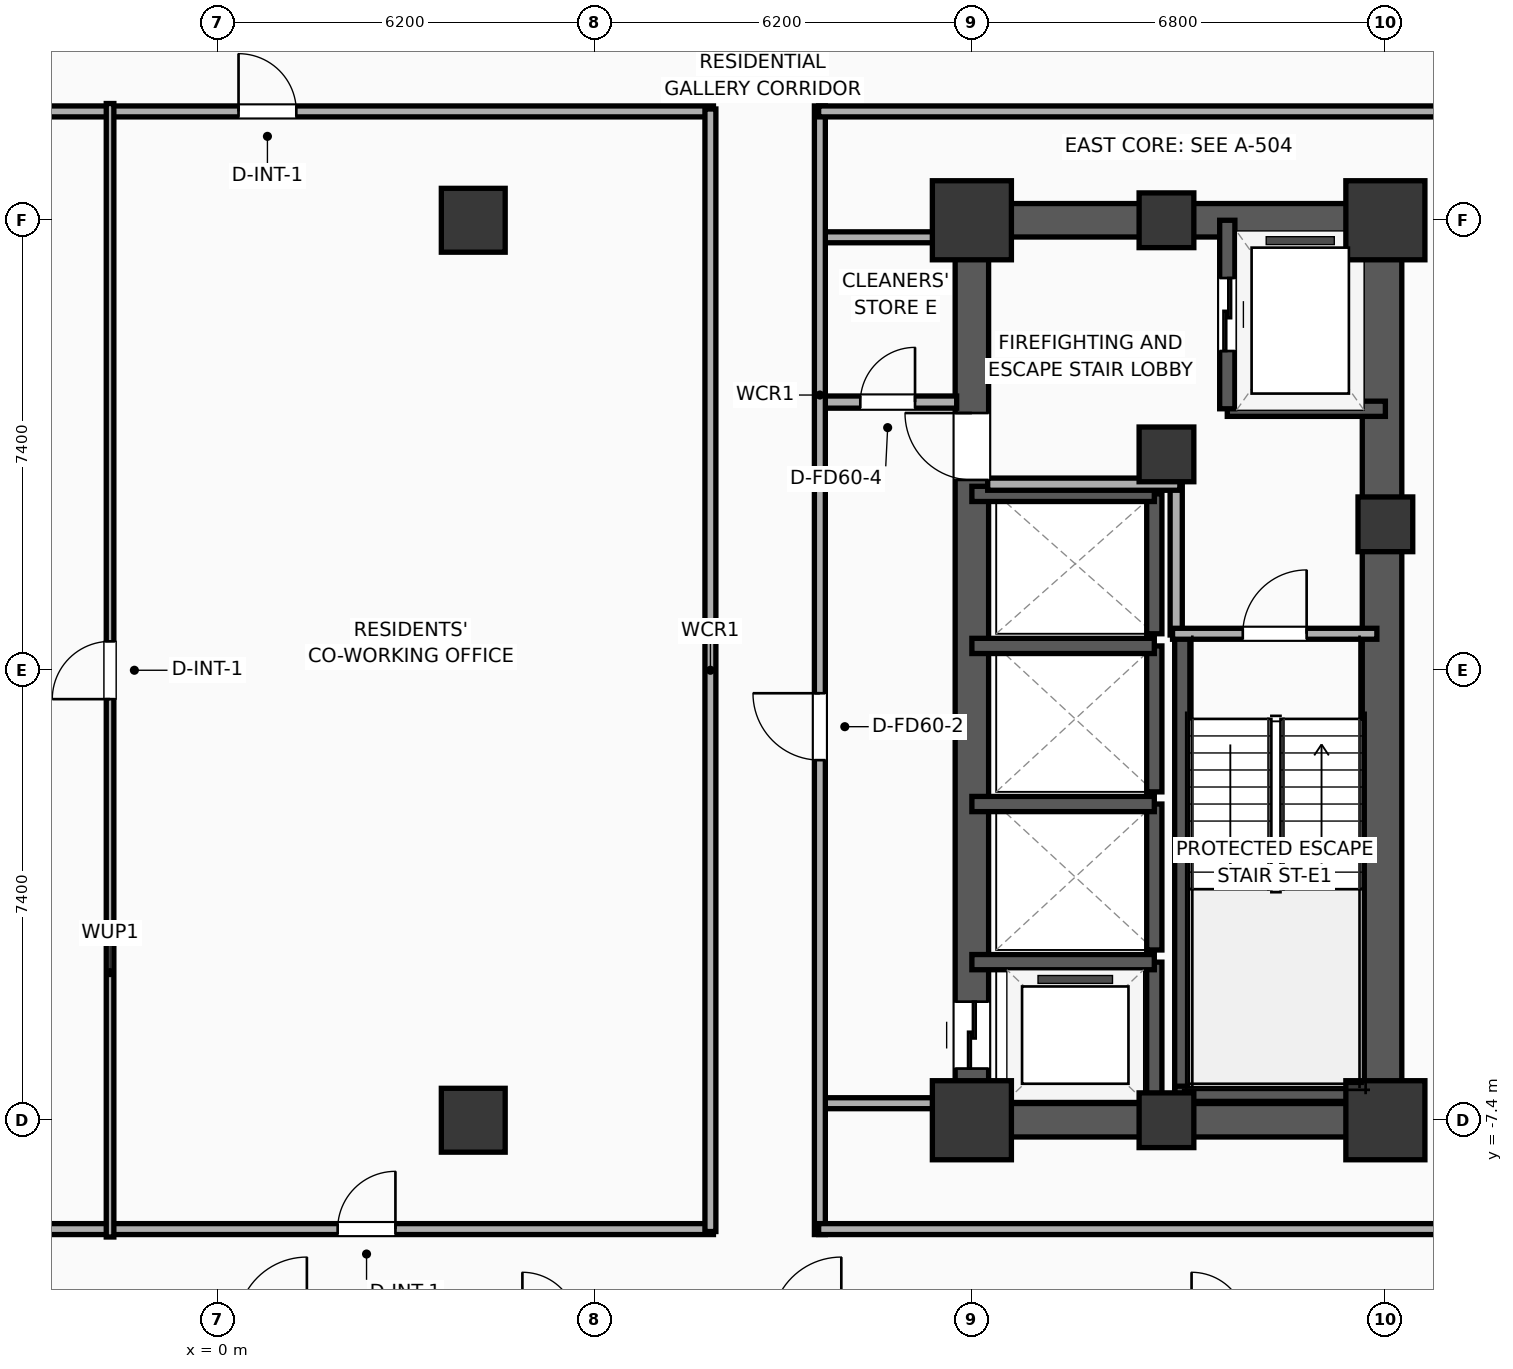
"""IFC4 building model, lengths in metres.
Left out: names, types, materials, properties, quantities, classifications, styles, units other than length and angle.
Written with IfcOpenShell. Run it as: python <this file> out.ifc"""

import sys

from ifc_helpers import new_model, si_unit, direction, frame, frame_2d, origin, origin_2d, place, context, subcontext, project, spatial, rectangle, extrude, element, fill, save


model = new_model("IFC4")
c1 = context("Model", 3, precision=1e-05, world=origin(), true_north=direction((0.0, 1.0)))
c2 = subcontext(c1, "Body", "Model", "MODEL_VIEW")
j1 = project(units=[si_unit("LENGTHUNIT", "METRE"), si_unit("PLANEANGLEUNIT", "RADIAN")], contexts=[c1])
p1 = place(None, origin())
s1 = spatial("IfcSite", under=j1, at=p1, CompositionType="ELEMENT")
p2 = place(p1, origin())
s2 = spatial("IfcBuilding", under=s1, at=p2, CompositionType="ELEMENT")
p3 = place(p2, frame((0.0, 0.0, 85.8)))
s3 = spatial("IfcBuildingStorey", under=s2, at=p3, CompositionType="ELEMENT", Elevation=85.8)
p4 = place(p3, frame((12.4, -7.4, 0.0), z_axis=(0.0, 0.0, 1.0), x_axis=(1.0, 0.0, 0.0)))
e1 = element("IfcColumn", 1, at=p4, inside=s3, PredefinedType="COLUMN", context=c2, shape_type="SweptSolid", body=[
    extrude(rectangle(XDim=1.3, YDim=1.3, at=origin_2d()), origin(), (0.0, 0.0, 1.0), 3.9),
])
p5 = place(p3, frame((15.6, 3.55, 0.0), z_axis=(0.0, 0.0, 1.0), x_axis=(1.0, 0.0, 0.0)))
e2 = element("IfcColumn", 2, at=p5, inside=s3, PredefinedType="COLUMN", context=c2, shape_type="SweptSolid", body=[
    extrude(rectangle(XDim=0.9, YDim=0.9, at=origin_2d()), origin(), (0.0, 0.0, 1.0), 3.9),
])
p6 = place(p3, frame((12.4, 7.4, 0.0), z_axis=(0.0, 0.0, 1.0), x_axis=(1.0, 0.0, 0.0)))
e3 = element("IfcColumn", 3, at=p6, inside=s3, PredefinedType="COLUMN", context=c2, shape_type="SweptSolid", body=[
    extrude(rectangle(XDim=1.3, YDim=1.3, at=origin_2d()), origin(), (0.0, 0.0, 1.0), 3.9),
])
for number, where, z_axis, x_axis in (
    (4, (15.6, -7.4, 0.0), (0.0, 0.0, 1.0), (1.0, 0.0, 0.0)),
    (5, (15.6, 7.4, 0.0), (0.0, 0.0, 1.0), (1.0, 0.0, 0.0)),
):
    element("IfcColumn", number, at=place(p3, frame(where, z_axis=z_axis, x_axis=x_axis)), inside=s3, PredefinedType="COLUMN", context=c2, shape_type="SweptSolid", body=[
        extrude(rectangle(XDim=0.9, YDim=0.9, at=origin_2d()), origin(), (0.0, 0.0, 1.0), 3.9),
    ])
p7 = place(p3, frame((19.2, -7.4, 0.0), z_axis=(0.0, 0.0, 1.0), x_axis=(1.0, 0.0, 0.0)))
e6 = element("IfcColumn", 6, at=p7, inside=s3, PredefinedType="COLUMN", context=c2, shape_type="SweptSolid", body=[
    extrude(rectangle(XDim=1.3, YDim=1.3, at=origin_2d()), origin(), (0.0, 0.0, 1.0), 3.9),
])
p8 = place(p3, frame((19.2, 2.4, 0.0), z_axis=(0.0, 0.0, 1.0), x_axis=(1.0, 0.0, 0.0)))
e7 = element("IfcColumn", 7, at=p8, inside=s3, PredefinedType="COLUMN", context=c2, shape_type="SweptSolid", body=[
    extrude(rectangle(XDim=0.9, YDim=0.9, at=origin_2d()), origin(), (0.0, 0.0, 1.0), 3.9),
])
p9 = place(p3, frame((19.2, 7.4, 0.0), z_axis=(0.0, 0.0, 1.0), x_axis=(1.0, 0.0, 0.0)))
e8 = element("IfcColumn", 8, at=p9, inside=s3, PredefinedType="COLUMN", context=c2, shape_type="SweptSolid", body=[
    extrude(rectangle(XDim=1.3, YDim=1.3, at=origin_2d()), origin(), (0.0, 0.0, 1.0), 3.9),
])
for number, where, z_axis, x_axis in (
    (9, (12.125, -7.4, 0.0), (0.0, 0.0, 1.0), (1.0, 0.0, 0.0)),
    (10, (12.125, 7.4, 0.0), (0.0, 0.0, 1.0), (1.0, 0.0, 0.0)),
):
    element("IfcWall", number, at=place(p3, frame(where, z_axis=z_axis, x_axis=x_axis)), inside=s3, PredefinedType="SHEAR", context=c2, shape_type="SweptSolid", body=[
        extrude(rectangle(XDim=7.35, YDim=0.55, at=frame_2d((3.675, 0.0))), origin(), (0.0, 0.0, 1.0), 3.65),
    ])
p10 = place(p3, frame((12.4, -7.4, 0.0), z_axis=(0.0, 0.0, 1.0), x_axis=(0.0, 1.0, 0.0)))
e11 = element("IfcWall", 11, at=p10, inside=s3, PredefinedType="SHEAR", context=c2, shape_type="SweptSolid", body=[
    extrude(rectangle(XDim=14.8, YDim=0.55, at=frame_2d((7.4, 0.0))), origin(), (0.0, 0.0, 1.0), 3.65),
])
p11 = place(p10, frame((0.85, 0.0, 0.0)))
e12 = element("IfcOpeningElement", 12, at=p11, cuts=e11, PredefinedType="OPENING", context=c2, shape_type="SweptSolid", body=[
    extrude(rectangle(XDim=1.1, YDim=2.05, at=frame_2d((0.55, 1.025))), frame((0.0, 0.285, 0.0), z_axis=(0.0, -1.0, 0.0), x_axis=(1.0, 0.0, 0.0)), (0.0, 0.0, 1.0), 0.57),
])
p12 = place(p10, frame((10.53, 0.0, 0.0)))
e13 = element("IfcOpeningElement", 13, at=p12, cuts=e11, PredefinedType="OPENING", context=c2, shape_type="SweptSolid", body=[
    extrude(rectangle(XDim=1.1, YDim=2.05, at=frame_2d((0.55, 1.025))), frame((0.0, 0.285, 0.0), z_axis=(0.0, -1.0, 0.0), x_axis=(1.0, 0.0, 0.0)), (0.0, 0.0, 1.0), 0.57),
])
p13 = place(p3, frame((19.145, -7.4, 0.0), z_axis=(0.0, 0.0, 1.0), x_axis=(0.0, 1.0, 0.0)))
e14 = element("IfcWall", 14, at=p13, inside=s3, PredefinedType="SHEAR", context=c2, shape_type="SweptSolid", body=[
    extrude(rectangle(XDim=14.8, YDim=0.65, at=frame_2d((7.4, 0.0))), origin(), (0.0, 0.0, 1.0), 3.65),
])
p14 = place(p3, frame((15.86, -7.085, 0.0), z_axis=(0.0, 0.0, 1.0), x_axis=(0.0, 1.0, 0.0)))
e15 = element("IfcWall", 15, at=p14, inside=s3, PredefinedType="SOLIDWALL", context=c2, shape_type="SweptSolid", body=[
    extrude(rectangle(XDim=7.685, YDim=0.25, at=frame_2d((3.843, 0.0))), origin(), (0.0, 0.0, 1.0), 3.65),
])
p15 = place(p3, frame((15.74, -6.965, 0.0), z_axis=(0.0, 0.0, 1.0), x_axis=(1.0, 0.0, 0.0)))
e16 = element("IfcWall", 16, at=p15, inside=s3, PredefinedType="SOLIDWALL", context=c2, shape_type="SweptSolid", body=[
    extrude(rectangle(XDim=3.46, YDim=0.25, at=frame_2d((1.73, 0.0))), origin(), (0.0, 0.0, 1.0), 3.65),
])
for number, where, z_axis, x_axis in (
    (17, (4.2, -7.4, 0.0), (0.0, 0.0, 1.0), (1.0, 0.0, 0.0)),
    (18, (4.2, 7.4, 0.0), (0.0, 0.0, 1.0), (1.0, 0.0, 0.0)),
):
    element("IfcColumn", number, at=place(p3, frame(where, z_axis=z_axis, x_axis=x_axis)), inside=s3, PredefinedType="COLUMN", context=c2, shape_type="SweptSolid", body=[
        extrude(rectangle(XDim=1.05, YDim=1.05, at=origin_2d()), origin(), (0.0, 0.0, 1.0), 3.9),
    ])
p16 = place(p3, frame((16.6, 4.3, 0.0), z_axis=(0.0, 0.0, 1.0), x_axis=(1.0, 0.0, 0.0)))
e19 = element("IfcWall", 19, at=p16, inside=s3, PredefinedType="SOLIDWALL", context=c2, shape_type="SweptSolid", body=[
    extrude(rectangle(XDim=2.6, YDim=0.25, at=frame_2d((1.3, 0.0))), origin(), (0.0, 0.0, 1.0), 3.65),
])
p17 = place(p3, frame((16.6, 7.4, 0.0), z_axis=(0.0, 0.0, 1.0), x_axis=(0.0, -1.0, 0.0)))
e20 = element("IfcWall", 20, at=p17, inside=s3, PredefinedType="SOLIDWALL", context=c2, shape_type="SweptSolid", body=[
    extrude(rectangle(XDim=3.1, YDim=0.25, at=frame_2d((1.55, 0.0))), origin(), (0.0, 0.0, 1.0), 3.65),
])
p18 = place(p17, frame((0.95, 0.0, 0.0)))
e21 = element("IfcOpeningElement", 21, at=p18, cuts=e20, PredefinedType="OPENING", context=c2, shape_type="SweptSolid", body=[
    extrude(rectangle(XDim=1.2, YDim=2.05, at=frame_2d((0.6, 1.025))), frame((0.0, 0.135, 0.0), z_axis=(0.0, -1.0, 0.0), x_axis=(1.0, 0.0, 0.0)), (0.0, 0.0, 1.0), 0.27),
])
p19 = place(p3, frame((15.4, -7.4, 0.0), z_axis=(0.0, 0.0, 1.0), x_axis=(0.0, 1.0, 0.0)))
e22 = element("IfcWall", 22, at=p19, inside=s3, PredefinedType="SOLIDWALL", context=c2, shape_type="SweptSolid", body=[
    extrude(rectangle(XDim=2.6, YDim=0.25, at=frame_2d((1.3, 0.0))), origin(), (0.0, 0.0, 1.0), 3.65),
])
p20 = place(p3, frame((15.4, -4.8, 0.0), z_axis=(0.0, 0.0, 1.0), x_axis=(-1.0, 0.0, 0.0)))
e23 = element("IfcWall", 23, at=p20, inside=s3, PredefinedType="SOLIDWALL", context=c2, shape_type="SweptSolid", body=[
    extrude(rectangle(XDim=3.0, YDim=0.25, at=frame_2d((1.5, 0.0))), origin(), (0.0, 0.0, 1.0), 3.65),
])
p21 = place(p3, frame((15.4, -4.6, 0.0), z_axis=(0.0, 0.0, 1.0), x_axis=(0.0, 1.0, 0.0)))
e24 = element("IfcWall", 24, at=p21, inside=s3, PredefinedType="SOLIDWALL", context=c2, shape_type="SweptSolid", body=[
    extrude(rectangle(XDim=2.4, YDim=0.25, at=frame_2d((1.2, 0.0))), origin(), (0.0, 0.0, 1.0), 3.65),
])
p22 = place(p3, frame((15.4, -2.2, 0.0), z_axis=(0.0, 0.0, 1.0), x_axis=(-1.0, 0.0, 0.0)))
e25 = element("IfcWall", 25, at=p22, inside=s3, PredefinedType="SOLIDWALL", context=c2, shape_type="SweptSolid", body=[
    extrude(rectangle(XDim=3.0, YDim=0.25, at=frame_2d((1.5, 0.0))), origin(), (0.0, 0.0, 1.0), 3.65),
])
p23 = place(p3, frame((15.4, -2.0, 0.0), z_axis=(0.0, 0.0, 1.0), x_axis=(0.0, 1.0, 0.0)))
e26 = element("IfcWall", 26, at=p23, inside=s3, PredefinedType="SOLIDWALL", context=c2, shape_type="SweptSolid", body=[
    extrude(rectangle(XDim=2.4, YDim=0.25, at=frame_2d((1.2, 0.0))), origin(), (0.0, 0.0, 1.0), 3.65),
])
p24 = place(p3, frame((15.4, 0.4, 0.0), z_axis=(0.0, 0.0, 1.0), x_axis=(-1.0, 0.0, 0.0)))
e27 = element("IfcWall", 27, at=p24, inside=s3, PredefinedType="SOLIDWALL", context=c2, shape_type="SweptSolid", body=[
    extrude(rectangle(XDim=3.0, YDim=0.25, at=frame_2d((1.5, 0.0))), origin(), (0.0, 0.0, 1.0), 3.65),
])
p25 = place(p3, frame((15.4, 0.6, 0.0), z_axis=(0.0, 0.0, 1.0), x_axis=(0.0, 1.0, 0.0)))
e28 = element("IfcWall", 28, at=p25, inside=s3, PredefinedType="SOLIDWALL", context=c2, shape_type="SweptSolid", body=[
    extrude(rectangle(XDim=2.3, YDim=0.25, at=frame_2d((1.15, 0.0))), origin(), (0.0, 0.0, 1.0), 3.65),
])
p26 = place(p3, frame((15.4, 2.9, 0.0), z_axis=(0.0, 0.0, 1.0), x_axis=(-1.0, 0.0, 0.0)))
e29 = element("IfcWall", 29, at=p26, inside=s3, PredefinedType="SOLIDWALL", context=c2, shape_type="SweptSolid", body=[
    extrude(rectangle(XDim=3.0, YDim=0.25, at=frame_2d((1.5, 0.0))), origin(), (0.0, 0.0, 1.0), 3.65),
])
p27 = place(p3, frame((15.76, 0.58, 0.0), z_axis=(0.0, 0.0, 1.0), x_axis=(0.0, 1.0, 0.0)))
e30 = element("IfcWall", 30, at=p27, inside=s3, PredefinedType="PARTITIONING", context=c2, shape_type="SweptSolid", body=[
    extrude(rectangle(XDim=2.52, YDim=0.2, at=frame_2d((1.26, 0.0))), origin(), (0.0, 0.0, 1.0), 3.65),
])
p28 = place(p3, frame((12.66, 3.06, 0.0), z_axis=(0.0, 0.0, 1.0), x_axis=(1.0, 0.0, 0.0)))
e31 = element("IfcWall", 31, at=p28, inside=s3, PredefinedType="PARTITIONING", context=c2, shape_type="SweptSolid", body=[
    extrude(rectangle(XDim=3.16, YDim=0.2, at=frame_2d((1.58, 0.0))), origin(), (0.0, 0.0, 1.0), 3.65),
])
p29 = place(p3, frame((15.7, 0.6, 0.0), z_axis=(0.0, 0.0, 1.0), x_axis=(1.0, 0.0, 0.0)))
e32 = element("IfcWall", 32, at=p29, inside=s3, PredefinedType="PARTITIONING", context=c2, shape_type="SweptSolid", body=[
    extrude(rectangle(XDim=3.36, YDim=0.18, at=frame_2d((1.68, 0.0))), origin(), (0.0, 0.0, 1.0), 3.65),
])
p30 = place(p29, frame((1.155, 0.0, 0.0)))
e33 = element("IfcOpeningElement", 33, at=p30, cuts=e32, PredefinedType="OPENING", context=c2, shape_type="SweptSolid", body=[
    extrude(rectangle(XDim=1.05, YDim=2.05, at=frame_2d((0.525, 1.025))), frame((0.0, 0.1, 0.0), z_axis=(0.0, -1.0, 0.0), x_axis=(1.0, 0.0, 0.0)), (0.0, 0.0, 1.0), 0.2),
])
p31 = place(p3, frame((9.88, 4.41, 0.0), z_axis=(0.0, 0.0, 1.0), x_axis=(1.0, 0.0, 0.0)))
e34 = element("IfcWall", 34, at=p31, inside=s3, PredefinedType="PARTITIONING", context=c2, shape_type="SweptSolid", body=[
    extrude(rectangle(XDim=2.27, YDim=0.2, at=frame_2d((1.135, 0.0))), origin(), (0.0, 0.0, 1.0), 3.65),
])
p32 = place(p31, frame((0.685, 0.0, 0.0)))
e35 = element("IfcOpeningElement", 35, at=p32, cuts=e34, PredefinedType="OPENING", context=c2, shape_type="SweptSolid", body=[
    extrude(rectangle(XDim=0.9, YDim=2.05, at=frame_2d((0.45, 1.025))), frame((0.0, 0.11, 0.0), z_axis=(0.0, -1.0, 0.0), x_axis=(1.0, 0.0, 0.0)), (0.0, 0.0, 1.0), 0.22),
])
for number, where, z_axis, x_axis in (
    (36, (9.88, 7.12, 0.0), (0.0, 0.0, 1.0), (1.0, 0.0, 0.0)),
    (37, (9.88, -7.12, 0.0), (0.0, 0.0, 1.0), (1.0, 0.0, 0.0)),
):
    element("IfcWall", number, at=place(p3, frame(where, z_axis=z_axis, x_axis=x_axis)), inside=s3, PredefinedType="PARTITIONING", context=c2, shape_type="SweptSolid", body=[
        extrude(rectangle(XDim=2.27, YDim=0.18, at=frame_2d((1.135, 0.0))), origin(), (0.0, 0.0, 1.0), 3.65),
    ])
p33 = place(p3, frame((9.9, -9.28, 0.0), z_axis=(0.0, 0.0, 1.0), x_axis=(0.0, 1.0, 0.0)))
e38 = element("IfcWall", 38, at=p33, inside=s3, PredefinedType="PARTITIONING", context=c2, shape_type="SweptSolid", body=[
    extrude(rectangle(XDim=18.56, YDim=0.18, at=frame_2d((9.28, 0.0))), origin(), (0.0, 0.0, 1.0), 3.65),
])
p34 = place(p33, frame((7.802, 0.0, 0.0)))
e39 = element("IfcOpeningElement", 39, at=p34, cuts=e38, PredefinedType="OPENING", context=c2, shape_type="SweptSolid", body=[
    extrude(rectangle(XDim=1.1, YDim=2.05, at=frame_2d((0.55, 1.025))), frame((0.0, 0.1, 0.0), z_axis=(0.0, -1.0, 0.0), x_axis=(1.0, 0.0, 0.0)), (0.0, 0.0, 1.0), 0.2),
])
p35 = place(p3, frame((9.88, 9.19, 0.0), z_axis=(0.0, 0.0, 1.0), x_axis=(1.0, 0.0, 0.0)))
e40 = element("IfcWall", 40, at=p35, inside=s3, PredefinedType="PARTITIONING", context=c2, shape_type="SweptSolid", body=[
    extrude(rectangle(XDim=23.33, YDim=0.18, at=frame_2d((11.665, 0.0))), origin(), (0.0, 0.0, 1.0), 3.65),
])
p36 = place(p35, frame((18.115, 0.0, 0.0)))
e41 = element("IfcOpeningElement", 41, at=p36, cuts=e40, PredefinedType="OPENING", context=c2, shape_type="SweptSolid", body=[
    extrude(rectangle(XDim=1.15, YDim=2.05, at=frame_2d((0.575, 1.025))), frame((0.0, 0.1, 0.0), z_axis=(0.0, -1.0, 0.0), x_axis=(1.0, 0.0, 0.0)), (0.0, 0.0, 1.0), 0.2),
])
p37 = place(p3, frame((9.88, -9.19, 0.0), z_axis=(0.0, 0.0, 1.0), x_axis=(1.0, 0.0, 0.0)))
e42 = element("IfcWall", 42, at=p37, inside=s3, PredefinedType="PARTITIONING", context=c2, shape_type="SweptSolid", body=[
    extrude(rectangle(XDim=23.33, YDim=0.18, at=frame_2d((11.665, 0.0))), origin(), (0.0, 0.0, 1.0), 3.65),
])
p38 = place(p3, frame((-8.15, 9.19, 0.0), z_axis=(0.0, 0.0, 1.0), x_axis=(1.0, 0.0, 0.0)))
e43 = element("IfcWall", 43, at=p38, inside=s3, PredefinedType="PARTITIONING", context=c2, shape_type="SweptSolid", body=[
    extrude(rectangle(XDim=16.3, YDim=0.18, at=frame_2d((8.15, 0.0))), origin(), (0.0, 0.0, 1.0), 3.65),
])
p39 = place(p38, frame((8.49, 0.0, 0.0)))
e44 = element("IfcOpeningElement", 44, at=p39, cuts=e43, PredefinedType="OPENING", context=c2, shape_type="SweptSolid", body=[
    extrude(rectangle(XDim=0.95, YDim=2.05, at=frame_2d((0.475, 1.025))), frame((0.0, 0.1, 0.0), z_axis=(0.0, -1.0, 0.0), x_axis=(1.0, 0.0, 0.0)), (0.0, 0.0, 1.0), 0.2),
])
p40 = place(p3, frame((-8.15, -9.19, 0.0), z_axis=(0.0, 0.0, 1.0), x_axis=(1.0, 0.0, 0.0)))
e45 = element("IfcWall", 45, at=p40, inside=s3, PredefinedType="PARTITIONING", context=c2, shape_type="SweptSolid", body=[
    extrude(rectangle(XDim=16.3, YDim=0.18, at=frame_2d((8.15, 0.0))), origin(), (0.0, 0.0, 1.0), 3.65),
])
p41 = place(p40, frame((1.13, 0.0, 0.0)))
e46 = element("IfcOpeningElement", 46, at=p41, cuts=e45, PredefinedType="OPENING", context=c2, shape_type="SweptSolid", body=[
    extrude(rectangle(XDim=1.0, YDim=2.05, at=frame_2d((0.5, 1.025))), frame((0.0, 0.1, 0.0), z_axis=(0.0, -1.0, 0.0), x_axis=(1.0, 0.0, 0.0)), (0.0, 0.0, 1.0), 0.2),
])
p42 = place(p40, frame((10.12, 0.0, 0.0)))
e47 = element("IfcOpeningElement", 47, at=p42, cuts=e45, PredefinedType="OPENING", context=c2, shape_type="SweptSolid", body=[
    extrude(rectangle(XDim=0.95, YDim=2.05, at=frame_2d((0.475, 1.025))), frame((0.0, 0.1, 0.0), z_axis=(0.0, -1.0, 0.0), x_axis=(1.0, 0.0, 0.0)), (0.0, 0.0, 1.0), 0.2),
])
p43 = place(p3, frame((8.1, -9.23, 0.0), z_axis=(0.0, 0.0, 1.0), x_axis=(0.0, 1.0, 0.0)))
e48 = element("IfcWall", 48, at=p43, inside=s3, PredefinedType="PARTITIONING", context=c2, shape_type="SweptSolid", body=[
    extrude(rectangle(XDim=18.46, YDim=0.18, at=frame_2d((9.23, 0.0))), origin(), (0.0, 0.0, 1.0), 3.65),
])
p44 = place(p3, frame((-1.773, -9.32, 0.0), z_axis=(0.0, 0.0, 1.0), x_axis=(0.0, 1.0, 0.0)))
e49 = element("IfcWall", 49, at=p44, inside=s3, PredefinedType="PARTITIONING", context=c2, shape_type="SweptSolid", body=[
    extrude(rectangle(XDim=18.64, YDim=0.125, at=frame_2d((9.32, 0.0))), origin(), (0.0, 0.0, 1.0), 3.65),
])
p45 = place(p44, frame((8.845, 0.0, 0.0)))
e50 = element("IfcOpeningElement", 50, at=p45, cuts=e49, PredefinedType="OPENING", context=c2, shape_type="SweptSolid", body=[
    extrude(rectangle(XDim=0.95, YDim=2.05, at=frame_2d((0.475, 1.025))), frame((0.0, 0.073, 0.0), z_axis=(0.0, -1.0, 0.0), x_axis=(1.0, 0.0, 0.0)), (0.0, 0.0, 1.0), 0.145),
])
p46 = place(p18, origin())
e51 = element("IfcDoor", 51, at=p46, inside=s3, OperationType="SLIDING_TO_LEFT", PredefinedType="DOOR", context=c2, shape_type="SweptSolid", body=[
    extrude(rectangle(XDim=1.2, YDim=2.05, at=frame_2d((0.6, 1.025))), frame((0.0, 0.025, 0.0), z_axis=(0.0, -1.0, 0.0), x_axis=(1.0, 0.0, 0.0)), (0.0, 0.0, 1.0), 0.05),
])
fill(e21, e51)
p47 = place(p11, origin())
e52 = element("IfcDoor", 52, at=p47, inside=s3, OperationType="SLIDING_TO_LEFT", PredefinedType="DOOR", context=c2, shape_type="SweptSolid", body=[
    extrude(rectangle(XDim=1.1, YDim=2.05, at=frame_2d((0.55, 1.025))), frame((0.0, 0.025, 0.0), z_axis=(0.0, -1.0, 0.0), x_axis=(1.0, 0.0, 0.0)), (0.0, 0.0, 1.0), 0.05),
])
fill(e12, e52)
p48 = place(p30, origin())
e53 = element("IfcDoor", 53, at=p48, inside=s3, OperationType="SINGLE_SWING_RIGHT", PredefinedType="DOOR", context=c2, shape_type="SweptSolid", body=[
    extrude(rectangle(XDim=1.05, YDim=2.05, at=frame_2d((0.525, 1.025))), frame((0.0, 0.025, 0.0), z_axis=(0.0, -1.0, 0.0), x_axis=(1.0, 0.0, 0.0)), (0.0, 0.0, 1.0), 0.05),
])
fill(e33, e53)
p49 = place(p32, origin())
e54 = element("IfcDoor", 54, at=p49, inside=s3, OperationType="SINGLE_SWING_RIGHT", PredefinedType="DOOR", context=c2, shape_type="SweptSolid", body=[
    extrude(rectangle(XDim=0.9, YDim=2.05, at=frame_2d((0.45, 1.025))), frame((0.0, 0.025, 0.0), z_axis=(0.0, -1.0, 0.0), x_axis=(1.0, 0.0, 0.0)), (0.0, 0.0, 1.0), 0.05),
])
fill(e35, e54)
p50 = place(p34, origin())
e55 = element("IfcDoor", 55, at=p50, inside=s3, OperationType="SINGLE_SWING_RIGHT", PredefinedType="DOOR", context=c2, shape_type="SweptSolid", body=[
    extrude(rectangle(XDim=1.1, YDim=2.05, at=frame_2d((0.55, 1.025))), frame((0.0, 0.025, 0.0), z_axis=(0.0, -1.0, 0.0), x_axis=(1.0, 0.0, 0.0)), (0.0, 0.0, 1.0), 0.05),
])
fill(e39, e55)
p51 = place(p39, origin())
e56 = element("IfcDoor", 56, at=p51, inside=s3, OperationType="SINGLE_SWING_LEFT", PredefinedType="DOOR", context=c2, shape_type="SweptSolid", body=[
    extrude(rectangle(XDim=0.95, YDim=2.05, at=frame_2d((0.475, 1.025))), frame((0.0, 0.025, 0.0), z_axis=(0.0, -1.0, 0.0), x_axis=(1.0, 0.0, 0.0)), (0.0, 0.0, 1.0), 0.05),
])
fill(e44, e56)
p52 = place(p42, origin())
e57 = element("IfcDoor", 57, at=p52, inside=s3, OperationType="SINGLE_SWING_RIGHT", PredefinedType="DOOR", context=c2, shape_type="SweptSolid", body=[
    extrude(rectangle(XDim=0.95, YDim=2.05, at=frame_2d((0.475, 1.025))), frame((0.0, 0.025, 0.0), z_axis=(0.0, -1.0, 0.0), x_axis=(1.0, 0.0, 0.0)), (0.0, 0.0, 1.0), 0.05),
])
fill(e47, e57)
p53 = place(p45, origin())
e58 = element("IfcDoor", 58, at=p53, inside=s3, OperationType="SINGLE_SWING_LEFT", PredefinedType="DOOR", context=c2, shape_type="SweptSolid", body=[
    extrude(rectangle(XDim=0.95, YDim=2.05, at=frame_2d((0.475, 1.025))), frame((0.0, 0.025, 0.0), z_axis=(0.0, -1.0, 0.0), x_axis=(1.0, 0.0, 0.0)), (0.0, 0.0, 1.0), 0.05),
])
fill(e50, e58)
p54 = place(p12, origin())
e59 = element("IfcDoor", 59, at=p54, inside=s3, OperationType="SINGLE_SWING_RIGHT", PredefinedType="DOOR", context=c2, shape_type="SweptSolid", body=[
    extrude(rectangle(XDim=1.1, YDim=2.05, at=frame_2d((0.55, 1.025))), frame((0.0, 0.025, 0.0), z_axis=(0.0, -1.0, 0.0), x_axis=(1.0, 0.0, 0.0)), (0.0, 0.0, 1.0), 0.05),
])
fill(e13, e59)
save(model, sys.argv[1])
